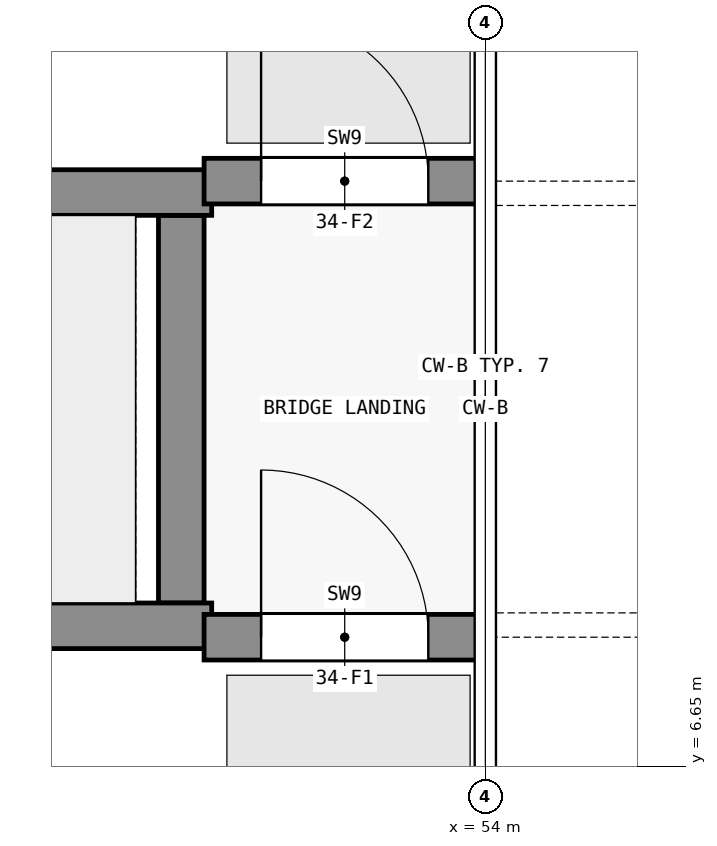
"""IFC4 building model, lengths in metres.
Left out: names, types, materials, properties, quantities, classifications, styles, units other than length and angle.
Written with IfcOpenShell. Run it as: python <this file> out.ifc"""

import sys

from ifc_helpers import new_model, si_unit, direction, frame, frame_2d, origin, place, context, subcontext, project, spatial, rectangle, extrude, element, fill, save


model = new_model("IFC4")
c1 = context("Model", 3, precision=1e-05, world=origin(), true_north=direction((0.0, 1.0)))
c2 = subcontext(c1, "Body", "Model", "MODEL_VIEW")
j1 = project(units=[si_unit("LENGTHUNIT", "METRE"), si_unit("PLANEANGLEUNIT", "RADIAN")], contexts=[c1])
p1 = place(None, origin())
s1 = spatial("IfcSite", under=j1, at=p1, CompositionType="ELEMENT")
p2 = place(p1, origin())
s2 = spatial("IfcBuilding", under=s1, at=p2, CompositionType="ELEMENT")
p3 = place(p2, frame((0.0, 0.0, 134.6)))
s3 = spatial("IfcBuildingStorey", under=s2, at=p3, CompositionType="ELEMENT", Elevation=134.6)
p4 = place(p3, frame((52.0, 7.725, 0.0), z_axis=(0.0, 0.0, 1.0), x_axis=(0.0, 1.0, 0.0)))
e1 = element("IfcWall", 1, at=p4, inside=s3, PredefinedType="SHEAR", context=c2, shape_type="SweptSolid", body=[
    extrude(rectangle(XDim=2.55, YDim=0.3, at=frame_2d((1.275, 0.0))), origin(), (0.0, 0.0, 1.0), 4.8),
])
for number, where, z_axis, x_axis in (
    (2, (45.0, 7.575, 0.0), (0.0, 0.0, 1.0), (1.0, 0.0, 0.0)),
    (3, (45.0, 10.425, 0.0), (0.0, 0.0, 1.0), (1.0, 0.0, 0.0)),
):
    element("IfcWall", number, at=place(p3, frame(where, z_axis=z_axis, x_axis=x_axis)), inside=s3, PredefinedType="SHEAR", context=c2, shape_type="SweptSolid", body=[
        extrude(rectangle(XDim=7.2, YDim=0.3, at=frame_2d((3.6, 0.0))), origin(), (0.0, 0.0, 1.0), 4.8),
    ])
p5 = place(p3, frame((52.15, 7.5, 0.0), z_axis=(0.0, 0.0, 1.0), x_axis=(1.0, 0.0, 0.0)))
e4 = element("IfcWall", 4, at=p5, inside=s3, PredefinedType="SHEAR", context=c2, shape_type="SweptSolid", body=[
    extrude(rectangle(XDim=1.85, YDim=0.3, at=frame_2d((0.925, 0.0))), origin(), (0.0, 0.0, 1.0), 4.3),
])
p6 = place(p5, frame((0.375, 0.0, 0.0)))
e5 = element("IfcOpeningElement", 5, at=p6, cuts=e4, PredefinedType="OPENING", context=c2, shape_type="SweptSolid", body=[
    extrude(rectangle(XDim=1.1, YDim=2.1, at=frame_2d((0.55, 1.05))), frame((0.0, 0.16, 0.0), z_axis=(0.0, -1.0, 0.0), x_axis=(1.0, 0.0, 0.0)), (0.0, 0.0, 1.0), 0.32),
])
p7 = place(p3, frame((52.15, 10.5, 0.0), z_axis=(0.0, 0.0, 1.0), x_axis=(1.0, 0.0, 0.0)))
e6 = element("IfcWall", 6, at=p7, inside=s3, PredefinedType="SHEAR", context=c2, shape_type="SweptSolid", body=[
    extrude(rectangle(XDim=1.85, YDim=0.3, at=frame_2d((0.925, 0.0))), origin(), (0.0, 0.0, 1.0), 4.3),
])
p8 = place(p7, frame((0.375, 0.0, 0.0)))
e7 = element("IfcOpeningElement", 7, at=p8, cuts=e6, PredefinedType="OPENING", context=c2, shape_type="SweptSolid", body=[
    extrude(rectangle(XDim=1.1, YDim=2.1, at=frame_2d((0.55, 1.05))), frame((0.0, 0.16, 0.0), z_axis=(0.0, -1.0, 0.0), x_axis=(1.0, 0.0, 0.0)), (0.0, 0.0, 1.0), 0.32),
])
p9 = place(p6, origin())
e8 = element("IfcDoor", 8, at=p9, inside=s3, OperationType="SINGLE_SWING_LEFT", PredefinedType="DOOR", context=c2, shape_type="SweptSolid", body=[
    extrude(rectangle(XDim=1.1, YDim=2.1, at=frame_2d((0.55, 1.05))), frame((0.0, 0.025, 0.0), z_axis=(0.0, -1.0, 0.0), x_axis=(1.0, 0.0, 0.0)), (0.0, 0.0, 1.0), 0.05),
])
fill(e5, e8)
p10 = place(p8, origin())
e9 = element("IfcDoor", 9, at=p10, inside=s3, OperationType="SINGLE_SWING_LEFT", PredefinedType="DOOR", context=c2, shape_type="SweptSolid", body=[
    extrude(rectangle(XDim=1.1, YDim=2.1, at=frame_2d((0.55, 1.05))), frame((0.0, 0.025, 0.0), z_axis=(0.0, -1.0, 0.0), x_axis=(1.0, 0.0, 0.0)), (0.0, 0.0, 1.0), 0.05),
])
fill(e7, e9)
save(model, sys.argv[1])
